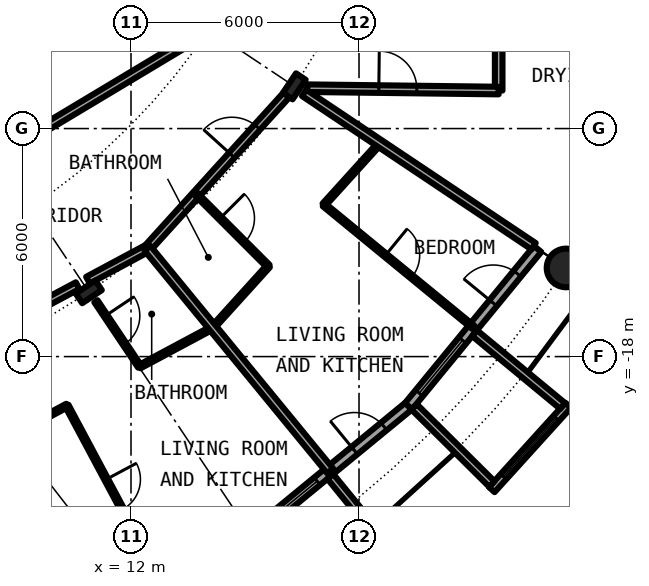
"""IFC4 building model, lengths in metres.
Left out: names, types, materials, properties, quantities, classifications, styles, units other than length and angle.
Written with IfcOpenShell. Run it as: python <this file> out.ifc"""

import sys

from ifc_helpers import new_model, si_unit, direction, frame, frame_2d, origin, origin_2d, place, context, subcontext, project, spatial, rectangle, circle, hollow_circle, i_section, extrude, element, fill, save


model = new_model("IFC4")
c1 = context("Model", 3, precision=1e-05, world=origin(), true_north=direction((0.0, 1.0)))
c2 = subcontext(c1, "Body", "Model", "MODEL_VIEW")
j1 = project(units=[si_unit("LENGTHUNIT", "METRE"), si_unit("PLANEANGLEUNIT", "RADIAN")], contexts=[c1])
p1 = place(None, origin())
s1 = spatial("IfcSite", under=j1, at=p1, CompositionType="ELEMENT")
p2 = place(p1, origin())
s2 = spatial("IfcBuilding", under=s1, at=p2, CompositionType="ELEMENT")
p3 = place(p2, frame((0.0, 0.0, 47.2)))
s3 = spatial("IfcBuildingStorey", under=s2, at=p3, CompositionType="ELEMENT", Elevation=47.2)
p4 = place(p3, frame((23.448, -15.667, 0.0), z_axis=(0.0, 0.0, 1.0), x_axis=(1.0, 0.0, 0.0)))
e1 = element("IfcColumn", 1, at=p4, inside=s3, PredefinedType="COLUMN", context=c2, shape_type="SweptSolid", body=[
    extrude(hollow_circle(Radius=0.508, WallThickness=0.05, at=origin_2d()), origin(), (0.0, 0.0, 1.0), 3.05),
])
for number, where, z_axis, x_axis in (
    (2, (10.889, -16.297, 0.0), (0.0, 0.0, 1.0), (0.556, -0.831, 0.0)),
    (3, (16.297, -10.889, 0.0), (0.0, 0.0, 1.0), (0.831, -0.556, 0.0)),
):
    element("IfcColumn", number, at=place(p3, frame(where, z_axis=z_axis, x_axis=x_axis)), inside=s3, PredefinedType="COLUMN", context=c2, shape_type="SweptSolid", body=[
        extrude(i_section(OverallWidth=0.305, OverallDepth=0.62, WebThickness=0.021, FlangeThickness=0.04, FilletRadius=0.027, at=origin_2d()), origin(), (0.0, 0.0, 1.0), 3.05),
    ])
p5 = place(p3, frame((15.167, -22.699, 0.0), z_axis=(0.0, 0.0, 1.0), x_axis=(0.773019449054, 0.634382322723, 0.0)))
e4 = element("IfcWall", 4, at=p5, inside=s3, PredefinedType="SOLIDWALL", context=c2, shape_type="SweptSolid", body=[
    extrude(rectangle(XDim=5.352, YDim=0.25, at=frame_2d((2.676, 0.0))), origin(), (0.0, 0.0, 1.0), 2.7),
])
p6 = place(p5, frame((0.441, 0.0, 0.3)))
e5 = element("IfcOpeningElement", 5, at=p6, cuts=e4, PredefinedType="OPENING", context=c2, shape_type="SweptSolid", body=[
    extrude(rectangle(XDim=1.8, YDim=2.1, at=frame_2d((0.9, 1.05))), frame((0.0, 0.135, 0.0), z_axis=(0.0, -1.0, 0.0), x_axis=(1.0, 0.0, 0.0)), (0.0, 0.0, 1.0), 0.27),
])
p7 = place(p5, frame((3.51, 0.0, 0.0)))
e6 = element("IfcOpeningElement", 6, at=p7, cuts=e4, PredefinedType="OPENING", context=c2, shape_type="SweptSolid", body=[
    extrude(rectangle(XDim=1.0, YDim=2.2, at=frame_2d((0.5, 1.1))), frame((0.0, 0.135, 0.0), z_axis=(0.0, -1.0, 0.0), x_axis=(1.0, 0.0, 0.0)), (0.0, 0.0, 1.0), 0.27),
])
p8 = place(p3, frame((17.246, -21.155, -0.03), z_axis=(0.0, 0.0, 1.0), x_axis=(0.631741648902, -0.775179004516, 0.0)))
e7 = element("IfcWall", 7, at=p8, inside=s3, PredefinedType="SOLIDWALL", context=c2, shape_type="SweptSolid", body=[
    extrude(rectangle(XDim=3.006, YDim=0.2, at=frame_2d((1.503, 0.0))), origin(), (0.0, 0.0, 1.0), 2.73),
])
p9 = place(p3, frame((19.304, -19.304, 0.0), z_axis=(0.0, 0.0, 1.0), x_axis=(0.634382322723, 0.773019449054, 0.0)))
e8 = element("IfcWall", 8, at=p9, inside=s3, PredefinedType="SOLIDWALL", context=c2, shape_type="SweptSolid", body=[
    extrude(rectangle(XDim=5.352, YDim=0.25, at=frame_2d((2.676, 0.0))), origin(), (0.0, 0.0, 1.0), 2.7),
])
p10 = place(p9, frame((0.441, 0.0, 0.3)))
e9 = element("IfcOpeningElement", 9, at=p10, cuts=e8, PredefinedType="OPENING", context=c2, shape_type="SweptSolid", body=[
    extrude(rectangle(XDim=1.8, YDim=2.1, at=frame_2d((0.9, 1.05))), frame((0.0, 0.135, 0.0), z_axis=(0.0, -1.0, 0.0), x_axis=(1.0, 0.0, 0.0)), (0.0, 0.0, 1.0), 0.27),
])
p11 = place(p9, frame((3.51, 0.0, 0.0)))
e10 = element("IfcOpeningElement", 10, at=p11, cuts=e8, PredefinedType="OPENING", context=c2, shape_type="SweptSolid", body=[
    extrude(rectangle(XDim=1.0, YDim=2.2, at=frame_2d((0.5, 1.1))), frame((0.0, 0.135, 0.0), z_axis=(0.0, -1.0, 0.0), x_axis=(1.0, 0.0, 0.0)), (0.0, 0.0, 1.0), 0.27),
])
p12 = place(p3, frame((21.493, -21.5, -0.03), z_axis=(0.0, 0.0, 1.0), x_axis=(0.671506829416, 0.740998365753, 0.0)))
e11 = element("IfcWall", 11, at=p12, inside=s3, PredefinedType="SOLIDWALL", context=c2, shape_type="SweptSolid", body=[
    extrude(rectangle(XDim=2.993, YDim=0.2, at=frame_2d((1.497, 0.0))), origin(), (0.0, 0.0, 1.0), 2.73),
])
p13 = place(p12, frame((0.457, 0.0, 0.33)))
e12 = element("IfcOpeningElement", 12, at=p13, cuts=e11, PredefinedType="OPENING", context=c2, shape_type="SweptSolid", body=[
    extrude(circle(Radius=1.04, at=frame_2d((1.04, 1.04))), frame((0.0, 0.11, 0.0), z_axis=(0.0, -1.0, 0.0), x_axis=(1.0, 0.0, 0.0)), (0.0, 0.0, 1.0), 0.22),
])
p14 = place(p3, frame((19.45, -19.323, -0.03), z_axis=(0.0, 0.0, 1.0), x_axis=(0.709727076896, -0.704476739375, 0.0)))
e13 = element("IfcWall", 13, at=p14, inside=s3, PredefinedType="SOLIDWALL", context=c2, shape_type="SweptSolid", body=[
    extrude(rectangle(XDim=2.883, YDim=0.2, at=frame_2d((1.441, 0.0))), origin(), (0.0, 0.0, 1.0), 2.73),
])
p15 = place(p3, frame((21.041, -17.384, -0.03), z_axis=(0.0, 0.0, 1.0), x_axis=(0.770784861449, -0.63709551667, 0.0)))
e14 = element("IfcWall", 14, at=p15, inside=s3, PredefinedType="SOLIDWALL", context=c2, shape_type="SweptSolid", body=[
    extrude(rectangle(XDim=3.006, YDim=0.2, at=frame_2d((1.503, 0.0))), origin(), (0.0, 0.0, 1.0), 2.73),
])
p16 = place(p3, frame((14.153, -17.234, 0.0), z_axis=(0.0, 0.0, 1.0), x_axis=(0.671144831591, 0.741326254107, 0.0)))
e15 = element("IfcWall", 15, at=p16, inside=s3, PredefinedType="PARTITIONING", context=c2, shape_type="SweptSolid", body=[
    extrude(rectangle(XDim=2.181, YDim=0.1, at=frame_2d((1.091, 0.0))), origin(), (0.0, 0.0, 1.0), 2.7),
])
p17 = place(p3, frame((17.077, -14.006, 0.0), z_axis=(0.0, 0.0, 1.0), x_axis=(0.671396556615, 0.741098282123, 0.0)))
e16 = element("IfcWall", 16, at=p17, inside=s3, PredefinedType="PARTITIONING", context=c2, shape_type="SweptSolid", body=[
    extrude(rectangle(XDim=2.182, YDim=0.1, at=frame_2d((1.091, 0.0))), origin(), (0.0, 0.0, 1.0), 2.7),
])
p18 = place(p3, frame((6.478, -21.34, 0.0), z_axis=(0.0, 0.0, 1.0), x_axis=(0.881765663848, 0.471687729392, 0.0)))
e17 = element("IfcWall", 17, at=p18, inside=s3, PredefinedType="PARTITIONING", context=c2, shape_type="SweptSolid", body=[
    extrude(rectangle(XDim=4.355, YDim=0.1, at=frame_2d((2.177, 0.0))), origin(), (0.0, 0.0, 1.0), 2.7),
])
p19 = place(p18, frame((0.633, 0.0, 0.0)))
e18 = element("IfcOpeningElement", 18, at=p19, cuts=e17, PredefinedType="OPENING", context=c2, shape_type="SweptSolid", body=[
    extrude(rectangle(XDim=0.9, YDim=2.3, at=frame_2d((0.45, 1.15))), frame((0.0, 0.06, 0.0), z_axis=(0.0, -1.0, 0.0), x_axis=(1.0, 0.0, 0.0)), (0.0, 0.0, 1.0), 0.12),
])
p20 = place(p3, frame((12.229, -18.264, 0.0), z_axis=(0.0, 0.0, 1.0), x_axis=(0.881786813167, 0.471648191055, 0.0)))
e19 = element("IfcWall", 19, at=p20, inside=s3, PredefinedType="PARTITIONING", context=c2, shape_type="SweptSolid", body=[
    extrude(rectangle(XDim=2.175, YDim=0.1, at=frame_2d((1.087, 0.0))), origin(), (0.0, 0.0, 1.0), 2.7),
])
p21 = place(p3, frame((21.675, -11.0, 0.0), z_axis=(0.0, 0.0, 1.0), x_axis=(0.0, 1.0, 0.0)))
e20 = element("IfcWall", 20, at=p21, inside=s3, PredefinedType="PARTITIONING", context=c2, shape_type="SweptSolid", body=[
    extrude(rectangle(XDim=1.6, YDim=0.2, at=frame_2d((0.8, 0.0))), origin(), (0.0, 0.0, 1.0), 2.7),
])
p22 = place(p3, frame((12.434, -15.151, 0.0), z_axis=(0.0, 0.0, 1.0), x_axis=(0.671514934772, 0.740991020444, 0.0)))
e21 = element("IfcWall", 21, at=p22, inside=s3, PredefinedType="PARTITIONING", context=c2, shape_type="SweptSolid", body=[
    extrude(rectangle(XDim=5.598, YDim=0.2, at=frame_2d((2.799, 0.0))), origin(), (0.0, 0.0, 1.0), 2.38),
])
p23 = place(p22, frame((3.305, 0.0, 0.0)))
e22 = element("IfcOpeningElement", 22, at=p23, cuts=e21, PredefinedType="OPENING", context=c2, shape_type="SweptSolid", body=[
    extrude(rectangle(XDim=1.0, YDim=2.3, at=frame_2d((0.5, 1.15))), frame((0.0, 0.11, 0.0), z_axis=(0.0, -1.0, 0.0), x_axis=(1.0, 0.0, 0.0)), (0.0, 0.0, 1.0), 0.22),
])
p24 = place(p3, frame((5.69, -18.756, 0.0), z_axis=(0.0, 0.0, 1.0), x_axis=(0.881866548297, 0.471499089072, 0.0)))
e23 = element("IfcWall", 23, at=p24, inside=s3, PredefinedType="PARTITIONING", context=c2, shape_type="SweptSolid", body=[
    extrude(rectangle(XDim=5.563, YDim=0.2, at=frame_2d((2.782, 0.0))), origin(), (0.0, 0.0, 1.0), 2.38),
])
p25 = place(p24, frame((2.368, 0.0, 0.0)))
e24 = element("IfcOpeningElement", 24, at=p25, cuts=e23, PredefinedType="OPENING", context=c2, shape_type="SweptSolid", body=[
    extrude(rectangle(XDim=1.0, YDim=2.3, at=frame_2d((0.5, 1.15))), frame((0.0, 0.11, 0.0), z_axis=(0.0, -1.0, 0.0), x_axis=(1.0, 0.0, 0.0)), (0.0, 0.0, 1.0), 0.22),
])
p26 = place(p3, frame((10.867, -15.989, 0.0), z_axis=(0.0, 0.0, 1.0), x_axis=(0.881596178172, 0.472004426496, 0.0)))
e25 = element("IfcWall", 25, at=p26, inside=s3, PredefinedType="PARTITIONING", context=c2, shape_type="SweptSolid", body=[
    extrude(rectangle(XDim=1.78, YDim=0.2, at=frame_2d((0.89, 0.0))), origin(), (0.0, 0.0, 1.0), 2.38),
])
p27 = place(p3, frame((1.656, -16.819, 0.0), z_axis=(0.0, 0.0, 1.0), x_axis=(0.857773470126, 0.514027892189, 0.0)))
e26 = element("IfcWall", 26, at=p27, inside=s3, PredefinedType="PARTITIONING", context=c2, shape_type="SweptSolid", body=[
    extrude(rectangle(XDim=14.429, YDim=0.2, at=frame_2d((7.215, 0.0))), origin(), (0.0, 0.0, 1.0), 2.7),
])
p28 = place(p27, frame((4.318, 0.0, 0.0)))
e27 = element("IfcOpeningElement", 27, at=p28, cuts=e26, PredefinedType="OPENING", context=c2, shape_type="SweptSolid", body=[
    extrude(rectangle(XDim=1.0, YDim=2.3, at=frame_2d((0.5, 1.15))), frame((0.0, 0.11, 0.0), z_axis=(0.0, -1.0, 0.0), x_axis=(1.0, 0.0, 0.0)), (0.0, 0.0, 1.0), 0.22),
])
p29 = place(p3, frame((16.637, -10.938, 0.0), z_axis=(0.0, 0.0, 1.0), x_axis=(0.99992425795, -0.012307654658, 0.0)))
e28 = element("IfcWall", 28, at=p29, inside=s3, PredefinedType="PARTITIONING", context=c2, shape_type="SweptSolid", body=[
    extrude(rectangle(XDim=5.039, YDim=0.2, at=frame_2d((2.519, 0.0))), origin(), (0.0, 0.0, 1.0), 2.7),
])
p30 = place(p29, frame((1.884, 0.0, 0.0)))
e29 = element("IfcOpeningElement", 29, at=p30, cuts=e28, PredefinedType="OPENING", context=c2, shape_type="SweptSolid", body=[
    extrude(rectangle(XDim=1.0, YDim=2.3, at=frame_2d((0.5, 1.15))), frame((0.0, 0.11, 0.0), z_axis=(0.0, -1.0, 0.0), x_axis=(1.0, 0.0, 0.0)), (0.0, 0.0, 1.0), 0.22),
])
p31 = place(p3, frame((8.392, -20.314, 0.0), z_axis=(0.0, 0.0, 1.0), x_axis=(0.381673756215, -0.924297107978, 0.0)))
e30 = element("IfcWall", 30, at=p31, inside=s3, PredefinedType="PARTITIONING", context=c2, shape_type="SweptSolid", body=[
    extrude(rectangle(XDim=5.195, YDim=0.1, at=frame_2d((2.598, 0.0))), origin(), (0.0, 0.0, 1.0), 2.7),
])
p32 = place(p3, frame((10.31, -19.289, 0.0), z_axis=(0.0, 0.0, 1.0), x_axis=(0.47140999111, -0.881914179658, 0.0)))
e31 = element("IfcWall", 31, at=p32, inside=s3, PredefinedType="PARTITIONING", context=c2, shape_type="SweptSolid", body=[
    extrude(rectangle(XDim=5.303, YDim=0.1, at=frame_2d((2.652, 0.0))), origin(), (0.0, 0.0, 1.0), 2.7),
])
p33 = place(p32, frame((2.202, 0.0, 0.0)))
e32 = element("IfcOpeningElement", 32, at=p33, cuts=e31, PredefinedType="OPENING", context=c2, shape_type="SweptSolid", body=[
    extrude(rectangle(XDim=0.9, YDim=2.3, at=frame_2d((0.45, 1.15))), frame((0.0, 0.06, 0.0), z_axis=(0.0, -1.0, 0.0), x_axis=(1.0, 0.0, 0.0)), (0.0, 0.0, 1.0), 0.12),
])
p34 = place(p3, frame((11.077, -16.544, 0.0), z_axis=(0.0, 0.0, 1.0), x_axis=(0.556522278225, -0.830832687031, 0.0)))
e33 = element("IfcWall", 33, at=p34, inside=s3, PredefinedType="PARTITIONING", context=c2, shape_type="SweptSolid", body=[
    extrude(rectangle(XDim=2.07, YDim=0.1, at=frame_2d((1.035, 0.0))), origin(), (0.0, 0.0, 1.0), 2.7),
])
p35 = place(p34, frame((0.458, 0.0, 0.0)))
e34 = element("IfcOpeningElement", 34, at=p35, cuts=e33, PredefinedType="OPENING", context=c2, shape_type="SweptSolid", body=[
    extrude(rectangle(XDim=0.9, YDim=2.3, at=frame_2d((0.45, 1.15))), frame((0.0, 0.06, 0.0), z_axis=(0.0, -1.0, 0.0), x_axis=(1.0, 0.0, 0.0)), (0.0, 0.0, 1.0), 0.12),
])
p36 = place(p3, frame((12.434, -15.151, 0.0), z_axis=(0.0, 0.0, 1.0), x_axis=(0.634381303318, -0.773020285633, 0.0)))
e35 = element("IfcWall", 35, at=p36, inside=s3, PredefinedType="PARTITIONING", context=c2, shape_type="SweptSolid", body=[
    extrude(rectangle(XDim=7.576, YDim=0.2, at=frame_2d((3.788, 0.0))), origin(), (0.0, 0.0, 1.0), 2.7),
])
p37 = place(p3, frame((13.722, -13.73, 0.0), z_axis=(0.0, 0.0, 1.0), x_axis=(0.706741540154, -0.707471833659, 0.0)))
e36 = element("IfcWall", 36, at=p37, inside=s3, PredefinedType="PARTITIONING", context=c2, shape_type="SweptSolid", body=[
    extrude(rectangle(XDim=2.674, YDim=0.1, at=frame_2d((1.337, 0.0))), origin(), (0.0, 0.0, 1.0), 2.7),
])
p38 = place(p37, frame((0.887, 0.0, 0.0)))
e37 = element("IfcOpeningElement", 37, at=p38, cuts=e36, PredefinedType="OPENING", context=c2, shape_type="SweptSolid", body=[
    extrude(rectangle(XDim=0.9, YDim=2.3, at=frame_2d((0.45, 1.15))), frame((0.0, 0.06, 0.0), z_axis=(0.0, -1.0, 0.0), x_axis=(1.0, 0.0, 0.0)), (0.0, 0.0, 1.0), 0.12),
])
p39 = place(p3, frame((16.555, -11.061, 0.0), z_axis=(0.0, 0.0, 1.0), x_axis=(0.831465568067, -0.555576285599, 0.0)))
e38 = element("IfcWall", 38, at=p39, inside=s3, PredefinedType="PARTITIONING", context=c2, shape_type="SweptSolid", body=[
    extrude(rectangle(XDim=7.264, YDim=0.2, at=frame_2d((3.632, 0.0))), origin(), (0.0, 0.0, 1.0), 2.7),
])
p40 = place(p3, frame((17.077, -14.006, 0.0), z_axis=(0.0, 0.0, 1.0), x_axis=(0.77326214499, -0.634086472908, 0.0)))
e39 = element("IfcWall", 39, at=p40, inside=s3, PredefinedType="PARTITIONING", context=c2, shape_type="SweptSolid", body=[
    extrude(rectangle(XDim=5.089, YDim=0.1, at=frame_2d((2.544, 0.0))), origin(), (0.0, 0.0, 1.0), 2.7),
])
p41 = place(p40, frame((2.094, 0.0, 0.0)))
e40 = element("IfcOpeningElement", 40, at=p41, cuts=e39, PredefinedType="OPENING", context=c2, shape_type="SweptSolid", body=[
    extrude(rectangle(XDim=0.9, YDim=2.3, at=frame_2d((0.45, 1.15))), frame((0.0, 0.06, 0.0), z_axis=(0.0, -1.0, 0.0), x_axis=(1.0, 0.0, 0.0)), (0.0, 0.0, 1.0), 0.12),
])
p42 = place(p6, origin())
e41 = element("IfcWindow", 41, at=p42, inside=s3, PartitioningType="SINGLE_PANEL", PredefinedType="WINDOW", context=c2, shape_type="SweptSolid", body=[
    extrude(rectangle(XDim=1.8, YDim=2.1, at=frame_2d((0.9, 1.05))), frame((0.0, 0.03, 0.0), z_axis=(0.0, -1.0, 0.0), x_axis=(1.0, 0.0, 0.0)), (0.0, 0.0, 1.0), 0.06),
])
fill(e5, e41)
p43 = place(p7, origin())
e42 = element("IfcDoor", 42, at=p43, inside=s3, OperationType="SINGLE_SWING_LEFT", PredefinedType="DOOR", context=c2, shape_type="SweptSolid", body=[
    extrude(rectangle(XDim=1.0, YDim=2.2, at=frame_2d((0.5, 1.1))), frame((0.0, 0.025, 0.0), z_axis=(0.0, -1.0, 0.0), x_axis=(1.0, 0.0, 0.0)), (0.0, 0.0, 1.0), 0.05),
])
fill(e6, e42)
p44 = place(p10, origin())
e43 = element("IfcWindow", 43, at=p44, inside=s3, PartitioningType="SINGLE_PANEL", PredefinedType="WINDOW", context=c2, shape_type="SweptSolid", body=[
    extrude(rectangle(XDim=1.8, YDim=2.1, at=frame_2d((0.9, 1.05))), frame((0.0, 0.03, 0.0), z_axis=(0.0, -1.0, 0.0), x_axis=(1.0, 0.0, 0.0)), (0.0, 0.0, 1.0), 0.06),
])
fill(e9, e43)
p45 = place(p13, origin())
e44 = element("IfcWindow", 44, at=p45, inside=s3, PartitioningType="SINGLE_PANEL", PredefinedType="WINDOW", context=c2, shape_type="SweptSolid", body=[
    extrude(circle(Radius=1.04, at=frame_2d((1.04, 1.04))), frame((0.0, 0.03, 0.0), z_axis=(0.0, -1.0, 0.0), x_axis=(1.0, 0.0, 0.0)), (0.0, 0.0, 1.0), 0.06),
])
fill(e12, e44)
p46 = place(p11, origin())
e45 = element("IfcDoor", 45, at=p46, inside=s3, OperationType="SINGLE_SWING_LEFT", PredefinedType="DOOR", context=c2, shape_type="SweptSolid", body=[
    extrude(rectangle(XDim=1.0, YDim=2.2, at=frame_2d((0.5, 1.1))), frame((0.0, 0.025, 0.0), z_axis=(0.0, -1.0, 0.0), x_axis=(1.0, 0.0, 0.0)), (0.0, 0.0, 1.0), 0.05),
])
fill(e10, e45)
p47 = place(p35, origin())
e46 = element("IfcDoor", 46, at=p47, inside=s3, OperationType="SINGLE_SWING_LEFT", PredefinedType="DOOR", context=c2, shape_type="SweptSolid", body=[
    extrude(rectangle(XDim=0.9, YDim=2.3, at=frame_2d((0.45, 1.15))), frame((0.0, 0.025, 0.0), z_axis=(0.0, -1.0, 0.0), x_axis=(1.0, 0.0, 0.0)), (0.0, 0.0, 1.0), 0.05),
])
fill(e34, e46)
p48 = place(p33, origin())
e47 = element("IfcDoor", 47, at=p48, inside=s3, OperationType="SINGLE_SWING_RIGHT", PredefinedType="DOOR", context=c2, shape_type="SweptSolid", body=[
    extrude(rectangle(XDim=0.9, YDim=2.3, at=frame_2d((0.45, 1.15))), frame((0.0, 0.025, 0.0), z_axis=(0.0, -1.0, 0.0), x_axis=(1.0, 0.0, 0.0)), (0.0, 0.0, 1.0), 0.05),
])
fill(e32, e47)
p49 = place(p23, origin())
e48 = element("IfcDoor", 48, at=p49, inside=s3, OperationType="SINGLE_SWING_RIGHT", PredefinedType="DOOR", context=c2, shape_type="SweptSolid", body=[
    extrude(rectangle(XDim=1.0, YDim=2.3, at=frame_2d((0.5, 1.15))), frame((0.0, 0.025, 0.0), z_axis=(0.0, -1.0, 0.0), x_axis=(1.0, 0.0, 0.0)), (0.0, 0.0, 1.0), 0.05),
])
fill(e22, e48)
p50 = place(p38, origin())
e49 = element("IfcDoor", 49, at=p50, inside=s3, OperationType="SINGLE_SWING_RIGHT", PredefinedType="DOOR", context=c2, shape_type="SweptSolid", body=[
    extrude(rectangle(XDim=0.9, YDim=2.3, at=frame_2d((0.45, 1.15))), frame((0.0, 0.025, 0.0), z_axis=(0.0, -1.0, 0.0), x_axis=(1.0, 0.0, 0.0)), (0.0, 0.0, 1.0), 0.05),
])
fill(e37, e49)
p51 = place(p41, origin())
e50 = element("IfcDoor", 50, at=p51, inside=s3, OperationType="SINGLE_SWING_LEFT", PredefinedType="DOOR", context=c2, shape_type="SweptSolid", body=[
    extrude(rectangle(XDim=0.9, YDim=2.3, at=frame_2d((0.45, 1.15))), frame((0.0, 0.025, 0.0), z_axis=(0.0, -1.0, 0.0), x_axis=(1.0, 0.0, 0.0)), (0.0, 0.0, 1.0), 0.05),
])
fill(e40, e50)
p52 = place(p30, origin())
e51 = element("IfcDoor", 51, at=p52, inside=s3, OperationType="SINGLE_SWING_LEFT", PredefinedType="DOOR", context=c2, shape_type="SweptSolid", body=[
    extrude(rectangle(XDim=1.0, YDim=2.3, at=frame_2d((0.5, 1.15))), frame((0.0, 0.025, 0.0), z_axis=(0.0, -1.0, 0.0), x_axis=(1.0, 0.0, 0.0)), (0.0, 0.0, 1.0), 0.05),
])
fill(e29, e51)
save(model, sys.argv[1])
